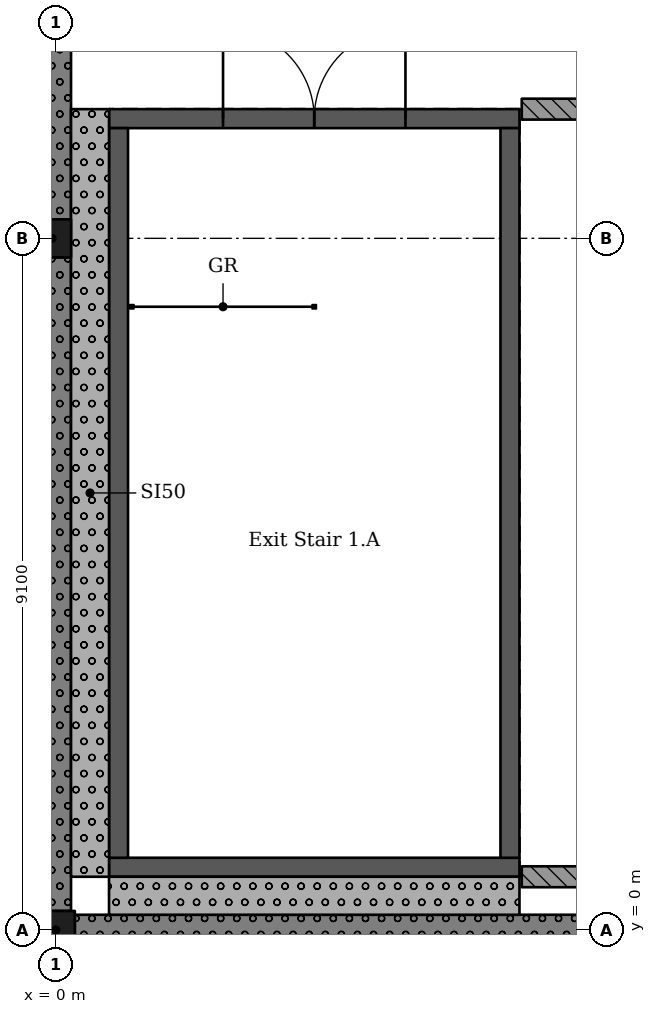
"""IFC4 building model, lengths in metres.
Left out: names, types, materials, properties, quantities, classifications, styles, units other than length and angle.
Written with IfcOpenShell. Run it as: python <this file> out.ifc"""

import sys

from ifc_helpers import new_model, si_unit, direction, frame, frame_2d, origin, origin_2d, place, context, subcontext, project, spatial, rectangle, extrude, element, fill, save


model = new_model("IFC4")
c1 = context("Model", 3, precision=1e-05, world=origin(), true_north=direction((0.0, 1.0)))
c2 = subcontext(c1, "Body", "Model", "MODEL_VIEW")
j1 = project(units=[si_unit("LENGTHUNIT", "METRE"), si_unit("PLANEANGLEUNIT", "RADIAN")], contexts=[c1])
p1 = place(None, origin())
s1 = spatial("IfcSite", under=j1, at=p1, CompositionType="ELEMENT")
p2 = place(p1, origin())
s2 = spatial("IfcBuilding", under=s1, at=p2, CompositionType="ELEMENT")
p3 = place(p2, frame((0.0, 0.0, 29.12)))
s3 = spatial("IfcBuildingStorey", under=s2, at=p3, CompositionType="ELEMENT", Elevation=29.12)
for number, where, z_axis, x_axis in (
    (1, (0.0, 0.0, 0.0), (0.0, 0.0, 1.0), (1.0, 0.0, 0.0)),
    (2, (-0.05, 9.1, 0.0), (0.0, 0.0, 1.0), (1.0, 0.0, 0.0)),
):
    element("IfcColumn", number, at=place(p3, frame(where, z_axis=z_axis, x_axis=x_axis)), inside=s3, PredefinedType="COLUMN", context=c2, shape_type="SweptSolid", body=[
        extrude(rectangle(XDim=0.5, YDim=0.5, at=origin_2d()), origin(), (0.0, 0.0, 1.0), 4.55),
    ])
p4 = place(p3, frame((6.1, 0.825, 0.0), z_axis=(0.0, 0.0, 1.0), x_axis=(-1.0, 0.0, 0.0)))
e3 = element("IfcWall", 3, at=p4, inside=s3, PredefinedType="SHEAR", context=c2, shape_type="SweptSolid", body=[
    extrude(rectangle(XDim=5.4, YDim=0.25, at=frame_2d((2.7, 0.0))), origin(), (0.0, 0.0, 1.0), 4.55),
])
p5 = place(p3, frame((6.1, 10.675, 0.0), z_axis=(0.0, 0.0, 1.0), x_axis=(-1.0, 0.0, 0.0)))
e4 = element("IfcWall", 4, at=p5, inside=s3, PredefinedType="SHEAR", context=c2, shape_type="SweptSolid", body=[
    extrude(rectangle(XDim=5.4, YDim=0.25, at=frame_2d((2.7, 0.0))), origin(), (0.0, 0.0, 1.0), 4.55),
])
p6 = place(p5, frame((1.5, 0.0, 0.0)))
e5 = element("IfcOpeningElement", 5, at=p6, cuts=e4, PredefinedType="OPENING", context=c2, shape_type="SweptSolid", body=[
    extrude(rectangle(XDim=2.4, YDim=2.1, at=frame_2d((1.2, 1.05))), frame((0.0, 0.135, 0.0), z_axis=(0.0, -1.0, 0.0), x_axis=(1.0, 0.0, 0.0)), (0.0, 0.0, 1.0), 0.27),
])
for number, where, z_axis, x_axis in (
    (6, (0.825, 10.55, 0.0), (0.0, 0.0, 1.0), (0.0, -1.0, 0.0)),
    (7, (5.975, 10.55, 0.0), (0.0, 0.0, 1.0), (0.0, -1.0, 0.0)),
):
    element("IfcWall", number, at=place(p3, frame(where, z_axis=z_axis, x_axis=x_axis)), inside=s3, PredefinedType="SHEAR", context=c2, shape_type="SweptSolid", body=[
        extrude(rectangle(XDim=9.6, YDim=0.25, at=frame_2d((4.8, 0.0))), origin(), (0.0, 0.0, 1.0), 4.55),
    ])
p7 = place(p3, frame((0.25, 0.025, 0.0), z_axis=(0.0, 0.0, 1.0), x_axis=(1.0, 0.0, 0.0)))
e8 = element("IfcWall", 8, at=p7, inside=s3, PredefinedType="SOLIDWALL", context=c2, shape_type="SweptSolid", body=[
    extrude(rectangle(XDim=8.6, YDim=0.35, at=frame_2d((4.3, 0.0))), origin(), (0.0, 0.0, 1.0), 4.5),
])
p8 = place(p3, frame((0.025, 17.95, 0.0), z_axis=(0.0, 0.0, 1.0), x_axis=(0.0, -1.0, 0.0)))
e9 = element("IfcWall", 9, at=p8, inside=s3, PredefinedType="SOLIDWALL", context=c2, shape_type="SweptSolid", body=[
    extrude(rectangle(XDim=8.6, YDim=0.35, at=frame_2d((4.3, 0.0))), origin(), (0.0, 0.0, 1.0), 4.5),
])
p9 = place(p3, frame((0.025, 8.85, 0.0), z_axis=(0.0, 0.0, 1.0), x_axis=(0.0, -1.0, 0.0)))
e10 = element("IfcWall", 10, at=p9, inside=s3, PredefinedType="SOLIDWALL", context=c2, shape_type="SweptSolid", body=[
    extrude(rectangle(XDim=8.6, YDim=0.35, at=frame_2d((4.3, 0.0))), origin(), (0.0, 0.0, 1.0), 4.5),
])
p10 = place(p3, frame((0.7, 0.45, 0.0), z_axis=(0.0, 0.0, 1.0), x_axis=(1.0, 0.0, 0.0)))
e11 = element("IfcWall", 11, at=p10, inside=s3, PredefinedType="SOLIDWALL", context=c2, shape_type="SweptSolid", body=[
    extrude(rectangle(XDim=5.4, YDim=0.5, at=frame_2d((2.7, 0.0))), origin(), (0.0, 0.0, 1.0), 3.88),
])
p11 = place(p3, frame((0.45, 0.7, 0.0), z_axis=(0.0, 0.0, 1.0), x_axis=(0.0, 1.0, 0.0)))
e12 = element("IfcWall", 12, at=p11, inside=s3, PredefinedType="SOLIDWALL", context=c2, shape_type="SweptSolid", body=[
    extrude(rectangle(XDim=10.1, YDim=0.5, at=frame_2d((5.05, 0.0))), origin(), (0.0, 0.0, 1.0), 3.88),
])
p12 = place(p3, frame((9.77, 0.7, 0.0), z_axis=(0.0, 0.0, 1.0), x_axis=(-1.0, 0.0, 0.0)))
e13 = element("IfcWall", 13, at=p12, inside=s3, PredefinedType="SOLIDWALL", context=c2, shape_type="SweptSolid", body=[
    extrude(rectangle(XDim=3.64, YDim=0.275, at=frame_2d((1.82, 0.0))), origin(), (0.0, 0.0, 1.0), 3.88),
])
p13 = place(p3, frame((9.77, 10.8, 0.0), z_axis=(0.0, 0.0, 1.0), x_axis=(-1.0, 0.0, 0.0)))
e14 = element("IfcWall", 14, at=p13, inside=s3, PredefinedType="SOLIDWALL", context=c2, shape_type="SweptSolid", body=[
    extrude(rectangle(XDim=3.64, YDim=0.275, at=frame_2d((1.82, 0.0))), origin(), (0.0, 0.0, 1.0), 3.88),
])
p14 = place(p13, frame((1.25, 0.0, 0.0)))
e15 = element("IfcOpeningElement", 15, at=p14, cuts=e14, PredefinedType="OPENING", context=c2, shape_type="SweptSolid", body=[
    extrude(rectangle(XDim=1.2, YDim=2.4, at=frame_2d((0.6, 1.2))), frame((0.0, 0.147, 0.0), z_axis=(0.0, -1.0, 0.0), x_axis=(1.0, 0.0, 0.0)), (0.0, 0.0, 1.0), 0.295),
])
p15 = place(p6, origin())
e16 = element("IfcDoor", 16, at=p15, inside=s3, OperationType="DOUBLE_DOOR_SINGLE_SWING", PredefinedType="DOOR", context=c2, shape_type="SweptSolid", body=[
    extrude(rectangle(XDim=2.4, YDim=2.1, at=frame_2d((1.2, 1.05))), frame((0.0, 0.025, 0.0), z_axis=(0.0, -1.0, 0.0), x_axis=(1.0, 0.0, 0.0)), (0.0, 0.0, 1.0), 0.05),
])
fill(e5, e16)
save(model, sys.argv[1])
